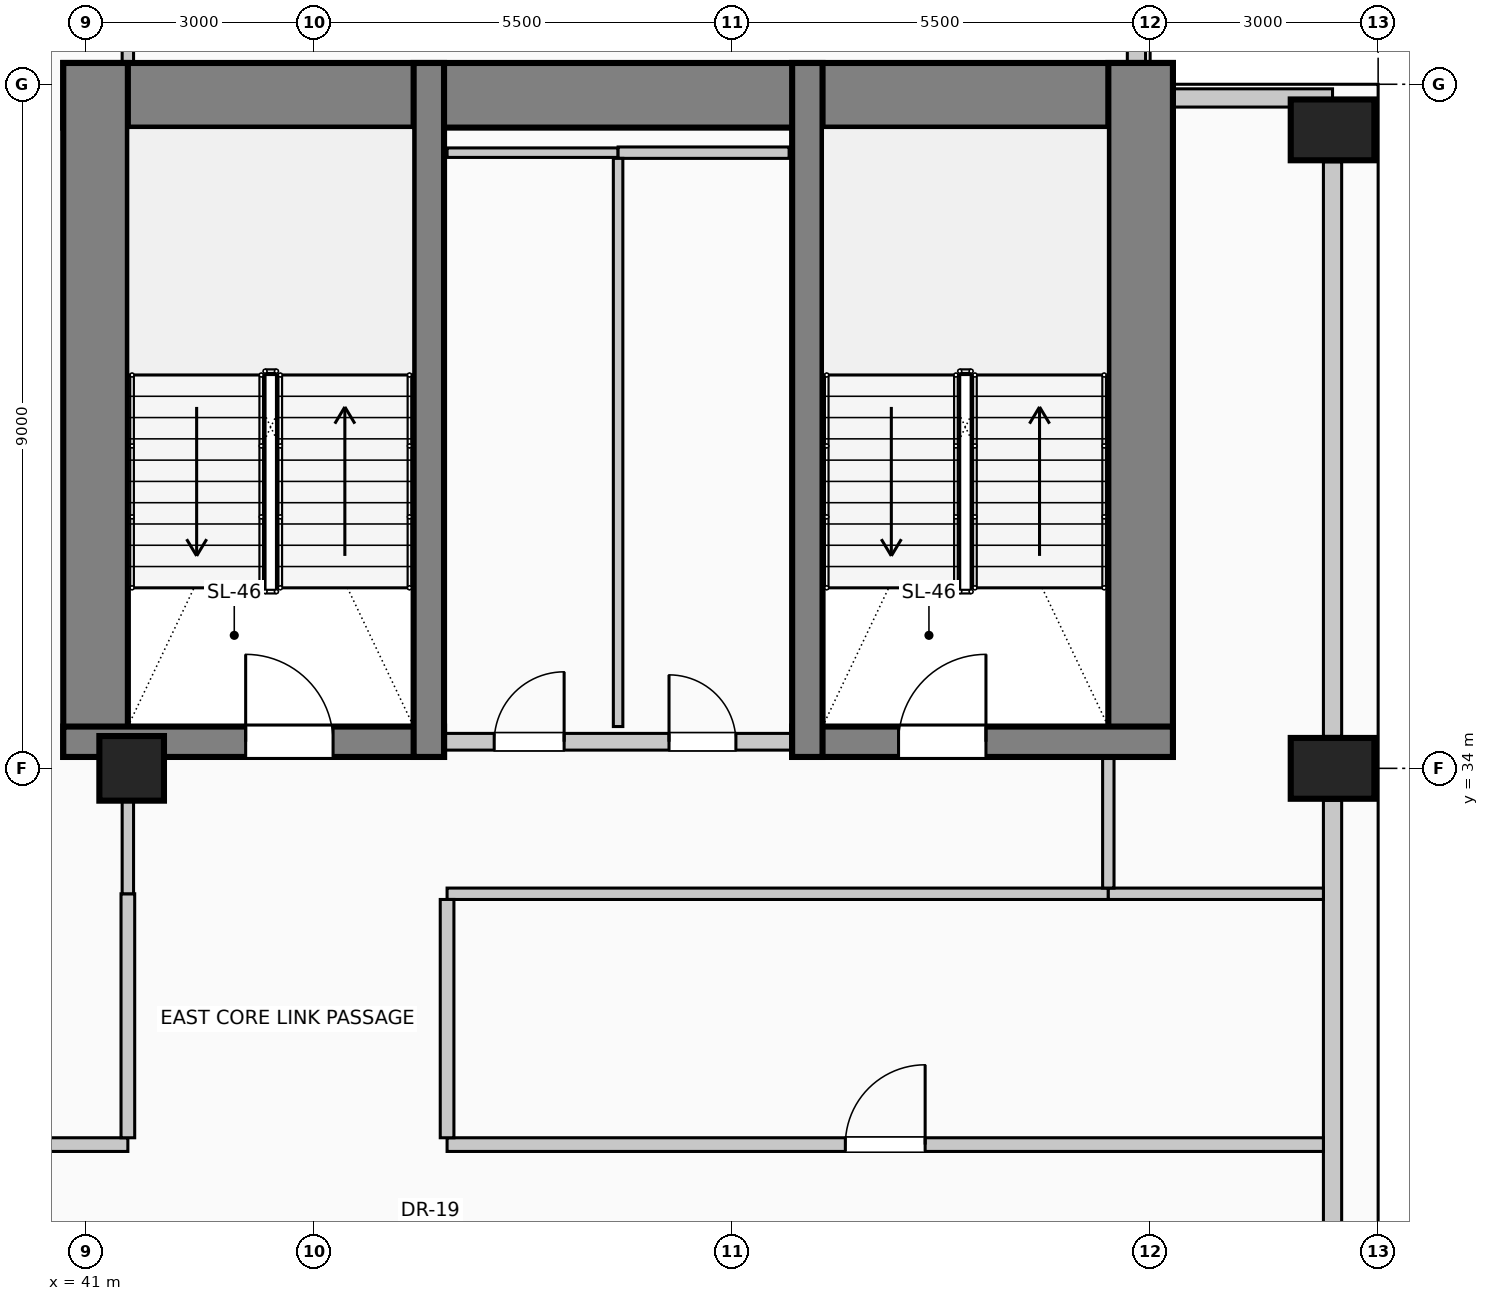
"""IFC4 building model, lengths in metres.
Left out: names, types, materials, properties, quantities, classifications, styles, units other than length and angle.
Written with IfcOpenShell. Run it as: python <this file> out.ifc"""

import sys

from ifc_helpers import new_model, si_unit, direction, frame, frame_2d, origin, origin_2d, place, context, subcontext, project, spatial, rectangle, circle, extrude, element, fill, save


model = new_model("IFC4")
c1 = context("Model", 3, precision=1e-05, world=origin(), true_north=direction((0.0, 1.0)))
c2 = subcontext(c1, "Body", "Model", "MODEL_VIEW")
j1 = project(units=[si_unit("LENGTHUNIT", "METRE"), si_unit("PLANEANGLEUNIT", "RADIAN")], contexts=[c1])
p1 = place(None, origin())
s1 = spatial("IfcSite", under=j1, at=p1, CompositionType="ELEMENT")
p2 = place(p1, origin())
s2 = spatial("IfcBuilding", under=s1, at=p2, CompositionType="ELEMENT")
p3 = place(p2, frame((0.0, 0.0, 170.6)))
s3 = spatial("IfcBuildingStorey", under=s2, at=p3, CompositionType="ELEMENT", Elevation=170.6)
p4 = place(p3, frame((40.7, 42.855, 0.0), z_axis=(0.0, 0.0, 1.0), x_axis=(1.0, 0.0, 0.0)))
e1 = element("IfcWall", 1, at=p4, inside=s3, PredefinedType="SHEAR", context=c2, shape_type="SweptSolid", body=[
    extrude(rectangle(XDim=14.6, YDim=0.85, at=frame_2d((7.3, 0.0))), origin(), (0.0, 0.0, 1.0), 4.0),
])
for number, where, z_axis, x_axis in (
    (2, (41.125, 34.15, 0.0), (0.0, 0.0, 1.0), (0.0, 1.0, 0.0)),
    (3, (54.875, 34.15, 0.0), (0.0, 0.0, 1.0), (0.0, 1.0, 0.0)),
):
    element("IfcWall", number, at=place(p3, frame(where, z_axis=z_axis, x_axis=x_axis)), inside=s3, PredefinedType="SHEAR", context=c2, shape_type="SweptSolid", body=[
        extrude(rectangle(XDim=9.13, YDim=0.85, at=frame_2d((4.565, 0.0))), origin(), (0.0, 0.0, 1.0), 4.0),
    ])
p5 = place(p3, frame((40.7, 34.35, 0.0), z_axis=(0.0, 0.0, 1.0), x_axis=(1.0, 0.0, 0.0)))
e4 = element("IfcWall", 4, at=p5, inside=s3, PredefinedType="SHEAR", context=c2, shape_type="SweptSolid", body=[
    extrude(rectangle(XDim=5.01, YDim=0.4, at=frame_2d((2.505, 0.0))), origin(), (0.0, 0.0, 1.0), 4.0),
])
p6 = place(p5, frame((2.4, 0.0, 0.0)))
e5 = element("IfcOpeningElement", 5, at=p6, cuts=e4, PredefinedType="OPENING", context=c2, shape_type="SweptSolid", body=[
    extrude(rectangle(XDim=1.15, YDim=2.2, at=frame_2d((0.575, 1.1))), frame((0.0, 0.21, 0.0), z_axis=(0.0, -1.0, 0.0), x_axis=(1.0, 0.0, 0.0)), (0.0, 0.0, 1.0), 0.42),
])
p7 = place(p3, frame((45.51, 34.15, 0.0), z_axis=(0.0, 0.0, 1.0), x_axis=(0.0, 1.0, 0.0)))
e6 = element("IfcWall", 6, at=p7, inside=s3, PredefinedType="SHEAR", context=c2, shape_type="SweptSolid", body=[
    extrude(rectangle(XDim=9.13, YDim=0.4, at=frame_2d((4.565, 0.0))), origin(), (0.0, 0.0, 1.0), 4.0),
])
p8 = place(p3, frame((50.29, 34.35, 0.0), z_axis=(0.0, 0.0, 1.0), x_axis=(1.0, 0.0, 0.0)))
e7 = element("IfcWall", 7, at=p8, inside=s3, PredefinedType="SHEAR", context=c2, shape_type="SweptSolid", body=[
    extrude(rectangle(XDim=5.01, YDim=0.4, at=frame_2d((2.505, 0.0))), origin(), (0.0, 0.0, 1.0), 4.0),
])
p9 = place(p8, frame((1.4, 0.0, 0.0)))
e8 = element("IfcOpeningElement", 8, at=p9, cuts=e7, PredefinedType="OPENING", context=c2, shape_type="SweptSolid", body=[
    extrude(rectangle(XDim=1.15, YDim=2.2, at=frame_2d((0.575, 1.1))), frame((0.0, 0.21, 0.0), z_axis=(0.0, -1.0, 0.0), x_axis=(1.0, 0.0, 0.0)), (0.0, 0.0, 1.0), 0.42),
])
p10 = place(p3, frame((50.49, 34.15, 0.0), z_axis=(0.0, 0.0, 1.0), x_axis=(0.0, 1.0, 0.0)))
e9 = element("IfcWall", 9, at=p10, inside=s3, PredefinedType="SHEAR", context=c2, shape_type="SweptSolid", body=[
    extrude(rectangle(XDim=9.13, YDim=0.4, at=frame_2d((4.565, 0.0))), origin(), (0.0, 0.0, 1.0), 4.0),
])
for number, where, z_axis, x_axis in (
    (10, (57.4, 34.0, 0.0), (0.0, 0.0, 1.0), (0.0, 1.0, 0.0)),
    (11, (57.4, 42.4, 0.0), (0.0, 0.0, 1.0), (0.0, 1.0, 0.0)),
):
    element("IfcColumn", number, at=place(p3, frame(where, z_axis=z_axis, x_axis=x_axis)), inside=s3, PredefinedType="COLUMN", context=c2, shape_type="SweptSolid", body=[
        extrude(rectangle(XDim=0.8, YDim=1.1, at=origin_2d()), origin(), (0.0, 0.0, 1.0), 4.0),
    ])
p11 = place(p3, frame((41.6, 34.0, 0.0), z_axis=(0.0, 0.0, 1.0), x_axis=(1.0, 0.0, 0.0)))
e12 = element("IfcColumn", 12, at=p11, inside=s3, PredefinedType="COLUMN", context=c2, shape_type="SweptSolid", body=[
    extrude(circle(Radius=0.425, at=origin_2d()), origin(), (0.0, 0.0, 1.0), 4.0),
])
p12 = place(p3, frame((57.4, 33.58, 0.0), z_axis=(0.0, 0.0, 1.0), x_axis=(0.0, -1.0, 0.0)))
e13 = element("IfcWall", 13, at=p12, inside=s3, PredefinedType="SOLIDWALL", context=c2, shape_type="SweptSolid", body=[
    extrude(rectangle(XDim=7.16, YDim=0.24, at=frame_2d((3.58, 0.0))), origin(), (0.0, 0.0, 1.0), 2.975),
])
p13 = place(p3, frame((57.4, 41.98, 0.0), z_axis=(0.0, 0.0, 1.0), x_axis=(0.0, -1.0, 0.0)))
e14 = element("IfcWall", 14, at=p13, inside=s3, PredefinedType="SOLIDWALL", context=c2, shape_type="SweptSolid", body=[
    extrude(rectangle(XDim=7.56, YDim=0.24, at=frame_2d((3.78, 0.0))), origin(), (0.0, 0.0, 1.0), 2.975),
])
p14 = place(p3, frame((54.82, 45.4, 0.0), z_axis=(0.0, 0.0, 1.0), x_axis=(0.0, -1.0, 0.0)))
e15 = element("IfcWall", 15, at=p14, inside=s3, PredefinedType="SOLIDWALL", context=c2, shape_type="SweptSolid", body=[
    extrude(rectangle(XDim=2.115, YDim=0.24, at=frame_2d((1.058, 0.0))), origin(), (0.0, 0.0, 1.0), 3.725),
])
p15 = place(p3, frame((55.305, 42.82, 0.0), z_axis=(0.0, 0.0, 1.0), x_axis=(1.0, 0.0, 0.0)))
e16 = element("IfcWall", 16, at=p15, inside=s3, PredefinedType="SOLIDWALL", context=c2, shape_type="SweptSolid", body=[
    extrude(rectangle(XDim=2.095, YDim=0.24, at=frame_2d((1.047, 0.0))), origin(), (0.0, 0.0, 1.0), 3.725),
])
p16 = place(p3, frame((45.72, 34.35, 0.0), z_axis=(0.0, 0.0, 1.0), x_axis=(1.0, 0.0, 0.0)))
e17 = element("IfcWall", 17, at=p16, inside=s3, PredefinedType="PARTITIONING", context=c2, shape_type="SweptSolid", body=[
    extrude(rectangle(XDim=4.56, YDim=0.22, at=frame_2d((2.28, 0.0))), origin(), (0.0, 0.0, 1.0), 3.725),
])
p17 = place(p16, frame((0.65, 0.0, 0.0)))
e18 = element("IfcOpeningElement", 18, at=p17, cuts=e17, PredefinedType="OPENING", context=c2, shape_type="SweptSolid", body=[
    extrude(rectangle(XDim=0.92, YDim=2.1, at=frame_2d((0.46, 1.05))), frame((0.0, 0.12, 0.0), z_axis=(0.0, -1.0, 0.0), x_axis=(1.0, 0.0, 0.0)), (0.0, 0.0, 1.0), 0.24),
])
p18 = place(p16, frame((2.95, 0.0, 0.0)))
e19 = element("IfcOpeningElement", 19, at=p18, cuts=e17, PredefinedType="OPENING", context=c2, shape_type="SweptSolid", body=[
    extrude(rectangle(XDim=0.88, YDim=2.1, at=frame_2d((0.44, 1.05))), frame((0.0, 0.12, 0.0), z_axis=(0.0, -1.0, 0.0), x_axis=(1.0, 0.0, 0.0)), (0.0, 0.0, 1.0), 0.24),
])
p19 = place(p3, frame((34.42, 29.05, 0.0), z_axis=(0.0, 0.0, 1.0), x_axis=(1.0, 0.0, 0.0)))
e20 = element("IfcWall", 20, at=p19, inside=s3, PredefinedType="PARTITIONING", context=c2, shape_type="SweptSolid", body=[
    extrude(rectangle(XDim=7.13, YDim=0.18, at=frame_2d((3.565, 0.0))), origin(), (0.0, 0.0, 1.0), 3.725),
])
p20 = place(p19, frame((3.09, 0.0, 0.0)))
e21 = element("IfcOpeningElement", 21, at=p20, cuts=e20, PredefinedType="OPENING", context=c2, shape_type="SweptSolid", body=[
    extrude(rectangle(XDim=0.95, YDim=2.15, at=frame_2d((0.475, 1.075))), frame((0.0, 0.1, 0.0), z_axis=(0.0, -1.0, 0.0), x_axis=(1.0, 0.0, 0.0)), (0.0, 0.0, 1.0), 0.2),
])
p21 = place(p3, frame((45.75, 29.05, 0.0), z_axis=(0.0, 0.0, 1.0), x_axis=(1.0, 0.0, 0.0)))
e22 = element("IfcWall", 22, at=p21, inside=s3, PredefinedType="PARTITIONING", context=c2, shape_type="SweptSolid", body=[
    extrude(rectangle(XDim=11.53, YDim=0.18, at=frame_2d((5.765, 0.0))), origin(), (0.0, 0.0, 1.0), 3.725),
])
p22 = place(p21, frame((5.24, 0.0, 0.0)))
e23 = element("IfcOpeningElement", 23, at=p22, cuts=e22, PredefinedType="OPENING", context=c2, shape_type="SweptSolid", body=[
    extrude(rectangle(XDim=1.05, YDim=2.15, at=frame_2d((0.525, 1.075))), frame((0.0, 0.1, 0.0), z_axis=(0.0, -1.0, 0.0), x_axis=(1.0, 0.0, 0.0)), (0.0, 0.0, 1.0), 0.2),
])
p23 = place(p3, frame((45.75, 32.35, 0.0), z_axis=(0.0, 0.0, 1.0), x_axis=(1.0, 0.0, 0.0)))
e24 = element("IfcWall", 24, at=p23, inside=s3, PredefinedType="PARTITIONING", context=c2, shape_type="SweptSolid", body=[
    extrude(rectangle(XDim=8.7, YDim=0.15, at=frame_2d((4.35, 0.0))), origin(), (0.0, 0.0, 1.0), 3.725),
])
p24 = place(p3, frame((54.45, 32.35, 0.0), z_axis=(0.0, 0.0, 1.0), x_axis=(1.0, 0.0, 0.0)))
e25 = element("IfcWall", 25, at=p24, inside=s3, PredefinedType="PARTITIONING", context=c2, shape_type="SweptSolid", body=[
    extrude(rectangle(XDim=2.83, YDim=0.15, at=frame_2d((1.415, 0.0))), origin(), (0.0, 0.0, 1.0), 3.725),
])
p25 = place(p3, frame((45.75, 42.1, 0.0), z_axis=(0.0, 0.0, 1.0), x_axis=(1.0, 0.0, 0.0)))
e26 = element("IfcWall", 26, at=p25, inside=s3, PredefinedType="PARTITIONING", context=c2, shape_type="SweptSolid", body=[
    extrude(rectangle(XDim=2.25, YDim=0.125, at=frame_2d((1.125, 0.0))), origin(), (0.0, 0.0, 1.0), 3.725),
])
p26 = place(p3, frame((48.0, 42.1, 0.0), z_axis=(0.0, 0.0, 1.0), x_axis=(1.0, 0.0, 0.0)))
e27 = element("IfcWall", 27, at=p26, inside=s3, PredefinedType="PARTITIONING", context=c2, shape_type="SweptSolid", body=[
    extrude(rectangle(XDim=2.25, YDim=0.15, at=frame_2d((1.125, 0.0))), origin(), (0.0, 0.0, 1.0), 3.725),
])
p27 = place(p3, frame((41.55, 29.14, 0.0), z_axis=(0.0, 0.0, 1.0), x_axis=(0.0, 1.0, 0.0)))
e28 = element("IfcWall", 28, at=p27, inside=s3, PredefinedType="PARTITIONING", context=c2, shape_type="SweptSolid", body=[
    extrude(rectangle(XDim=3.21, YDim=0.18, at=frame_2d((1.605, 0.0))), origin(), (0.0, 0.0, 1.0), 3.12),
])
p28 = place(p3, frame((41.55, 32.35, 0.0), z_axis=(0.0, 0.0, 1.0), x_axis=(0.0, 1.0, 0.0)))
e29 = element("IfcWall", 29, at=p28, inside=s3, PredefinedType="PARTITIONING", context=c2, shape_type="SweptSolid", body=[
    extrude(rectangle(XDim=1.225, YDim=0.15, at=frame_2d((0.612, 0.0))), origin(), (0.0, 0.0, 1.0), 3.12),
])
p29 = place(p3, frame((41.55, 43.28, 0.0), z_axis=(0.0, 0.0, 1.0), x_axis=(0.0, 1.0, 0.0)))
e30 = element("IfcWall", 30, at=p29, inside=s3, PredefinedType="PARTITIONING", context=c2, shape_type="SweptSolid", body=[
    extrude(rectangle(XDim=1.47, YDim=0.15, at=frame_2d((0.735, 0.0))), origin(), (0.0, 0.0, 1.0), 3.725),
])
p30 = place(p3, frame((45.75, 29.14, 0.0), z_axis=(0.0, 0.0, 1.0), x_axis=(0.0, 1.0, 0.0)))
e31 = element("IfcWall", 31, at=p30, inside=s3, PredefinedType="PARTITIONING", context=c2, shape_type="SweptSolid", body=[
    extrude(rectangle(XDim=3.135, YDim=0.18, at=frame_2d((1.567, 0.0))), origin(), (0.0, 0.0, 1.0), 3.725),
])
p31 = place(p3, frame((48.0, 34.55, 0.0), z_axis=(0.0, 0.0, 1.0), x_axis=(0.0, 1.0, 0.0)))
e32 = element("IfcWall", 32, at=p31, inside=s3, PredefinedType="PARTITIONING", context=c2, shape_type="SweptSolid", body=[
    extrude(rectangle(XDim=7.475, YDim=0.125, at=frame_2d((3.737, 0.0))), origin(), (0.0, 0.0, 1.0), 3.725),
])
p32 = place(p3, frame((54.45, 32.425, 0.0), z_axis=(0.0, 0.0, 1.0), x_axis=(0.0, 1.0, 0.0)))
e33 = element("IfcWall", 33, at=p32, inside=s3, PredefinedType="PARTITIONING", context=c2, shape_type="SweptSolid", body=[
    extrude(rectangle(XDim=1.725, YDim=0.15, at=frame_2d((0.862, 0.0))), origin(), (0.0, 0.0, 1.0), 3.725),
])
p33 = place(p6, origin())
e34 = element("IfcDoor", 34, at=p33, inside=s3, OperationType="SINGLE_SWING_LEFT", PredefinedType="DOOR", context=c2, shape_type="SweptSolid", body=[
    extrude(rectangle(XDim=1.15, YDim=2.2, at=frame_2d((0.575, 1.1))), frame((0.0, 0.025, 0.0), z_axis=(0.0, -1.0, 0.0), x_axis=(1.0, 0.0, 0.0)), (0.0, 0.0, 1.0), 0.05),
])
fill(e5, e34)
p34 = place(p17, origin())
e35 = element("IfcDoor", 35, at=p34, inside=s3, OperationType="SINGLE_SWING_RIGHT", PredefinedType="DOOR", context=c2, shape_type="SweptSolid", body=[
    extrude(rectangle(XDim=0.92, YDim=2.1, at=frame_2d((0.46, 1.05))), frame((0.0, 0.025, 0.0), z_axis=(0.0, -1.0, 0.0), x_axis=(1.0, 0.0, 0.0)), (0.0, 0.0, 1.0), 0.05),
])
fill(e18, e35)
p35 = place(p18, origin())
e36 = element("IfcDoor", 36, at=p35, inside=s3, OperationType="SINGLE_SWING_LEFT", PredefinedType="DOOR", context=c2, shape_type="SweptSolid", body=[
    extrude(rectangle(XDim=0.88, YDim=2.1, at=frame_2d((0.44, 1.05))), frame((0.0, 0.025, 0.0), z_axis=(0.0, -1.0, 0.0), x_axis=(1.0, 0.0, 0.0)), (0.0, 0.0, 1.0), 0.05),
])
fill(e19, e36)
p36 = place(p9, origin())
e37 = element("IfcDoor", 37, at=p36, inside=s3, OperationType="SINGLE_SWING_RIGHT", PredefinedType="DOOR", context=c2, shape_type="SweptSolid", body=[
    extrude(rectangle(XDim=1.15, YDim=2.2, at=frame_2d((0.575, 1.1))), frame((0.0, 0.025, 0.0), z_axis=(0.0, -1.0, 0.0), x_axis=(1.0, 0.0, 0.0)), (0.0, 0.0, 1.0), 0.05),
])
fill(e8, e37)
p37 = place(p22, origin())
e38 = element("IfcDoor", 38, at=p37, inside=s3, OperationType="SINGLE_SWING_RIGHT", PredefinedType="DOOR", context=c2, shape_type="SweptSolid", body=[
    extrude(rectangle(XDim=1.05, YDim=2.15, at=frame_2d((0.525, 1.075))), frame((0.0, 0.025, 0.0), z_axis=(0.0, -1.0, 0.0), x_axis=(1.0, 0.0, 0.0)), (0.0, 0.0, 1.0), 0.05),
])
fill(e23, e38)
save(model, sys.argv[1])
